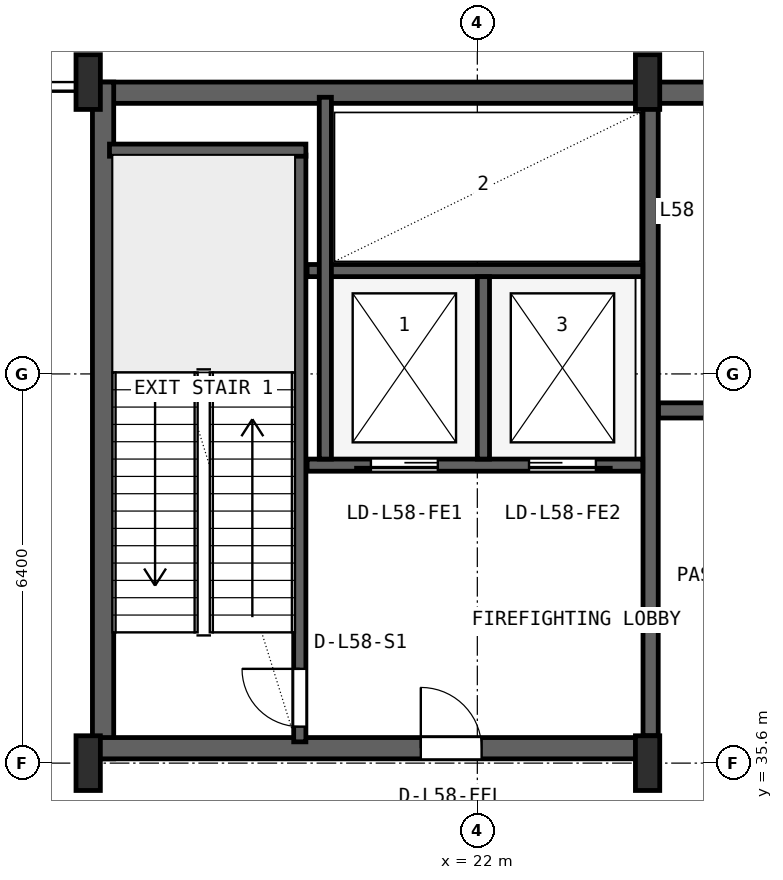
"""IFC4 building model, lengths in metres.
Left out: names, types, materials, properties, quantities, classifications, styles, units other than length and angle.
Written with IfcOpenShell. Run it as: python <this file> out.ifc"""

import sys

from ifc_helpers import new_model, si_unit, direction, frame, frame_2d, origin, origin_2d, place, context, subcontext, project, spatial, rectangle, i_section, extrude, source, transform, mapped, element, fill, save


model = new_model("IFC4")
c1 = context("Model", 3, precision=1e-05, world=origin(), true_north=direction((0.0, 1.0)))
c2 = subcontext(c1, "Body", "Model", "MODEL_VIEW")
j1 = project(units=[si_unit("LENGTHUNIT", "METRE"), si_unit("PLANEANGLEUNIT", "RADIAN")], contexts=[c1])
p1 = place(None, origin())
s1 = spatial("IfcSite", under=j1, at=p1, CompositionType="ELEMENT")
p2 = place(p1, origin())
s2 = spatial("IfcBuilding", under=s1, at=p2, CompositionType="ELEMENT")
p3 = place(p2, frame((0.0, 0.0, 234.0)))
s3 = spatial("IfcBuildingStorey", under=s2, at=p3, CompositionType="ELEMENT", Elevation=234.0)
p4 = place(p3, frame((15.6, 46.625, 0.0), z_axis=(0.0, 0.0, 1.0), x_axis=(1.0, 0.0, 0.0)))
e1 = element("IfcWall", 1, at=p4, inside=s3, PredefinedType="SHEAR", context=c2, shape_type="SweptSolid", body=[
    extrude(rectangle(XDim=36.8, YDim=0.35, at=frame_2d((18.4, 0.0))), origin(), (0.0, 0.0, 1.0), 5.15),
])
p5 = place(p3, frame((15.845, 35.67, 0.0), z_axis=(0.0, 0.0, 1.0), x_axis=(0.0, 1.0, 0.0)))
e2 = element("IfcWall", 2, at=p5, inside=s3, PredefinedType="SHEAR", context=c2, shape_type="SweptSolid", body=[
    extrude(rectangle(XDim=11.13, YDim=0.35, at=frame_2d((5.565, 0.0))), origin(), (0.0, 0.0, 1.0), 5.15),
])
p6 = place(p3, frame((15.67, 35.845, 0.0), z_axis=(0.0, 0.0, 1.0), x_axis=(1.0, 0.0, 0.0)))
e3 = element("IfcWall", 3, at=p6, inside=s3, PredefinedType="SHEAR", context=c2, shape_type="SweptSolid", body=[
    extrude(rectangle(XDim=9.13, YDim=0.35, at=frame_2d((4.565, 0.0))), origin(), (0.0, 0.0, 1.0), 5.15),
])
p7 = place(p6, frame((5.4, 0.0, 0.0)))
e4 = element("IfcOpeningElement", 4, at=p7, cuts=e3, PredefinedType="OPENING", context=c2, shape_type="SweptSolid", body=[
    extrude(rectangle(XDim=1.0, YDim=2.1, at=frame_2d((0.5, 1.05))), frame((0.0, 0.185, 0.0), z_axis=(0.0, -1.0, 0.0), x_axis=(1.0, 0.0, 0.0)), (0.0, 0.0, 1.0), 0.37),
])
m1 = source(origin(), c2, "Body", "SweptSolid", [
    extrude(i_section(OverallWidth=0.4, OverallDepth=0.9, WebThickness=0.016, FlangeThickness=0.028, FilletRadius=0.016, at=origin_2d()), origin(), (0.0, 0.0, 1.0), 5.4),
])
for number, where, z_axis, x_axis in (
    (5, (15.6, 35.6, 0.0), (0.0, 0.0, 1.0), (1.0, 0.0, 0.0)),
    (6, (15.6, 46.8, 0.0), (0.0, 0.0, 1.0), (1.0, 0.0, 0.0)),
    (7, (24.8, 35.6, 0.0), (0.0, 0.0, 1.0), (1.0, 0.0, 0.0)),
    (8, (24.8, 46.8, 0.0), (0.0, 0.0, 1.0), (1.0, 0.0, 0.0)),
):
    element("IfcColumn", number, at=place(p3, frame(where, z_axis=z_axis, x_axis=x_axis)), inside=s3, PredefinedType="COLUMN", context=c2, shape_type="MappedRepresentation", body=[
        mapped(m1, transform((0.0, 0.0, 0.0), x_axis=(1.0, 0.0, 0.0), y_axis=(0.0, 1.0, 0.0), z_axis=(0.0, 0.0, 1.0), scale=1.0)),
    ])
p8 = place(p3, frame((19.08, 35.95, 0.0), z_axis=(0.0, 0.0, 1.0), x_axis=(0.0, 1.0, 0.0)))
e9 = element("IfcWall", 9, at=p8, inside=s3, PredefinedType="SHEAR", context=c2, shape_type="SweptSolid", body=[
    extrude(rectangle(XDim=9.65, YDim=0.2, at=frame_2d((4.825, 0.0))), origin(), (0.0, 0.0, 1.0), 5.15),
])
p9 = place(p8, frame((0.25, 0.0, 0.0)))
e10 = element("IfcOpeningElement", 10, at=p9, cuts=e9, PredefinedType="OPENING", context=c2, shape_type="SweptSolid", body=[
    extrude(rectangle(XDim=0.95, YDim=2.1, at=frame_2d((0.475, 1.05))), frame((0.0, 0.11, 0.0), z_axis=(0.0, -1.0, 0.0), x_axis=(1.0, 0.0, 0.0)), (0.0, 0.0, 1.0), 0.22),
])
p10 = place(p3, frame((15.95, 45.68, 0.0), z_axis=(0.0, 0.0, 1.0), x_axis=(1.0, 0.0, 0.0)))
e11 = element("IfcWall", 11, at=p10, inside=s3, PredefinedType="SHEAR", context=c2, shape_type="SweptSolid", body=[
    extrude(rectangle(XDim=3.23, YDim=0.2, at=frame_2d((1.615, 0.0))), origin(), (0.0, 0.0, 1.0), 5.15),
])
p11 = place(p3, frame((24.85, 36.05, 0.0), z_axis=(0.0, 0.0, 1.0), x_axis=(0.0, 1.0, 0.0)))
e12 = element("IfcWall", 12, at=p11, inside=s3, PredefinedType="SHEAR", context=c2, shape_type="SweptSolid", body=[
    extrude(rectangle(XDim=10.45, YDim=0.25, at=frame_2d((5.225, 0.0))), origin(), (0.0, 0.0, 1.0), 5.15),
])
p12 = place(p3, frame((19.2, 40.5, 0.0), z_axis=(0.0, 0.0, 1.0), x_axis=(1.0, 0.0, 0.0)))
e13 = element("IfcWall", 13, at=p12, inside=s3, PredefinedType="SHEAR", context=c2, shape_type="SweptSolid", body=[
    extrude(rectangle(XDim=5.52, YDim=0.2, at=frame_2d((2.76, 0.0))), origin(), (0.0, 0.0, 1.0), 5.15),
])
p13 = place(p12, frame((1.05, 0.0, 0.0)))
e14 = element("IfcOpeningElement", 14, at=p13, cuts=e13, PredefinedType="OPENING", context=c2, shape_type="SweptSolid", body=[
    extrude(rectangle(XDim=1.1, YDim=2.18, at=frame_2d((0.55, 1.09))), frame((0.0, 0.11, 0.0), z_axis=(0.0, -1.0, 0.0), x_axis=(1.0, 0.0, 0.0)), (0.0, 0.0, 1.0), 0.22),
])
p14 = place(p12, frame((3.65, 0.0, 0.0)))
e15 = element("IfcOpeningElement", 15, at=p14, cuts=e13, PredefinedType="OPENING", context=c2, shape_type="SweptSolid", body=[
    extrude(rectangle(XDim=1.1, YDim=2.18, at=frame_2d((0.55, 1.09))), frame((0.0, 0.11, 0.0), z_axis=(0.0, -1.0, 0.0), x_axis=(1.0, 0.0, 0.0)), (0.0, 0.0, 1.0), 0.22),
])
p15 = place(p3, frame((19.2, 43.7, 0.0), z_axis=(0.0, 0.0, 1.0), x_axis=(1.0, 0.0, 0.0)))
e16 = element("IfcWall", 16, at=p15, inside=s3, PredefinedType="SHEAR", context=c2, shape_type="SweptSolid", body=[
    extrude(rectangle(XDim=5.52, YDim=0.2, at=frame_2d((2.76, 0.0))), origin(), (0.0, 0.0, 1.0), 5.15),
])
p16 = place(p3, frame((22.1, 40.6, 0.0), z_axis=(0.0, 0.0, 1.0), x_axis=(0.0, 1.0, 0.0)))
e17 = element("IfcWall", 17, at=p16, inside=s3, PredefinedType="SHEAR", context=c2, shape_type="SweptSolid", body=[
    extrude(rectangle(XDim=3.0, YDim=0.2, at=frame_2d((1.5, 0.0))), origin(), (0.0, 0.0, 1.0), 5.15),
])
p17 = place(p3, frame((19.5, 40.6, 0.0), z_axis=(0.0, 0.0, 1.0), x_axis=(0.0, 1.0, 0.0)))
e18 = element("IfcWall", 18, at=p17, inside=s3, PredefinedType="SHEAR", context=c2, shape_type="SweptSolid", body=[
    extrude(rectangle(XDim=5.95, YDim=0.2, at=frame_2d((2.975, 0.0))), origin(), (0.0, 0.0, 1.0), 5.15),
])
p18 = place(p3, frame((24.98, 41.4, 0.0), z_axis=(0.0, 0.0, 1.0), x_axis=(1.0, 0.0, 0.0)))
e19 = element("IfcWall", 19, at=p18, inside=s3, PredefinedType="SHEAR", context=c2, shape_type="SweptSolid", body=[
    extrude(rectangle(XDim=23.82, YDim=0.25, at=frame_2d((11.91, 0.0))), origin(), (0.0, 0.0, 1.0), 5.15),
])
p19 = place(p18, frame((3.56, 0.0, 0.0)))
e20 = element("IfcOpeningElement", 20, at=p19, cuts=e19, PredefinedType="OPENING", context=c2, shape_type="SweptSolid", body=[
    extrude(rectangle(XDim=1.0, YDim=2.08, at=frame_2d((0.5, 1.04))), frame((0.0, 0.135, 0.0), z_axis=(0.0, -1.0, 0.0), x_axis=(1.0, 0.0, 0.0)), (0.0, 0.0, 1.0), 0.27),
])
p20 = place(p18, frame((11.56, 0.0, 0.0)))
e21 = element("IfcOpeningElement", 21, at=p20, cuts=e19, PredefinedType="OPENING", context=c2, shape_type="SweptSolid", body=[
    extrude(rectangle(XDim=1.0, YDim=2.08, at=frame_2d((0.5, 1.04))), frame((0.0, 0.135, 0.0), z_axis=(0.0, -1.0, 0.0), x_axis=(1.0, 0.0, 0.0)), (0.0, 0.0, 1.0), 0.27),
])
m2 = source(origin(), c2, "Body", "SweptSolid", [
    extrude(rectangle(XDim=0.95, YDim=2.1, at=frame_2d((0.475, 1.05))), frame((0.0, 0.025, 0.0), z_axis=(0.0, -1.0, 0.0), x_axis=(1.0, 0.0, 0.0)), (0.0, 0.0, 1.0), 0.05),
])
p21 = place(p9, origin())
e22 = element("IfcDoor", 22, at=p21, inside=s3, OperationType="SINGLE_SWING_RIGHT", PredefinedType="DOOR", context=c2, shape_type="MappedRepresentation", body=[
    mapped(m2, transform((0.0, 0.0, 0.0), x_axis=(1.0, 0.0, 0.0), y_axis=(0.0, 1.0, 0.0), z_axis=(0.0, 0.0, 1.0), scale=1.0)),
])
fill(e10, e22)
m3 = source(origin(), c2, "Body", "SweptSolid", [
    extrude(rectangle(XDim=1.0, YDim=2.1, at=frame_2d((0.5, 1.05))), frame((0.0, 0.025, 0.0), z_axis=(0.0, -1.0, 0.0), x_axis=(1.0, 0.0, 0.0)), (0.0, 0.0, 1.0), 0.05),
])
p22 = place(p7, origin())
e23 = element("IfcDoor", 23, at=p22, inside=s3, OperationType="SINGLE_SWING_LEFT", PredefinedType="DOOR", context=c2, shape_type="MappedRepresentation", body=[
    mapped(m3, transform((0.0, 0.0, 0.0), x_axis=(1.0, 0.0, 0.0), y_axis=(0.0, 1.0, 0.0), z_axis=(0.0, 0.0, 1.0), scale=1.0)),
])
fill(e4, e23)
m4 = source(origin(), c2, "Body", "SweptSolid", [
    extrude(rectangle(XDim=1.1, YDim=2.18, at=frame_2d((0.55, 1.09))), frame((0.0, 0.025, 0.0), z_axis=(0.0, -1.0, 0.0), x_axis=(1.0, 0.0, 0.0)), (0.0, 0.0, 1.0), 0.05),
])
p23 = place(p13, frame((1.1, 0.0, 0.0), z_axis=(0.0, 0.0, 1.0), x_axis=(-1.0, 0.0, 0.0)))
e24 = element("IfcDoor", 24, at=p23, inside=s3, OperationType="SLIDING_TO_LEFT", PredefinedType="DOOR", context=c2, shape_type="MappedRepresentation", body=[
    mapped(m4, transform((0.0, 0.0, 0.0), x_axis=(1.0, 0.0, 0.0), y_axis=(0.0, 1.0, 0.0), z_axis=(0.0, 0.0, 1.0), scale=1.0)),
])
fill(e14, e24)
p24 = place(p14, frame((1.1, 0.0, 0.0), z_axis=(0.0, 0.0, 1.0), x_axis=(-1.0, 0.0, 0.0)))
e25 = element("IfcDoor", 25, at=p24, inside=s3, OperationType="SLIDING_TO_RIGHT", PredefinedType="DOOR", context=c2, shape_type="MappedRepresentation", body=[
    mapped(m4, transform((0.0, 0.0, 0.0), x_axis=(1.0, 0.0, 0.0), y_axis=(0.0, 1.0, 0.0), z_axis=(0.0, 0.0, 1.0), scale=1.0)),
])
fill(e15, e25)
save(model, sys.argv[1])
